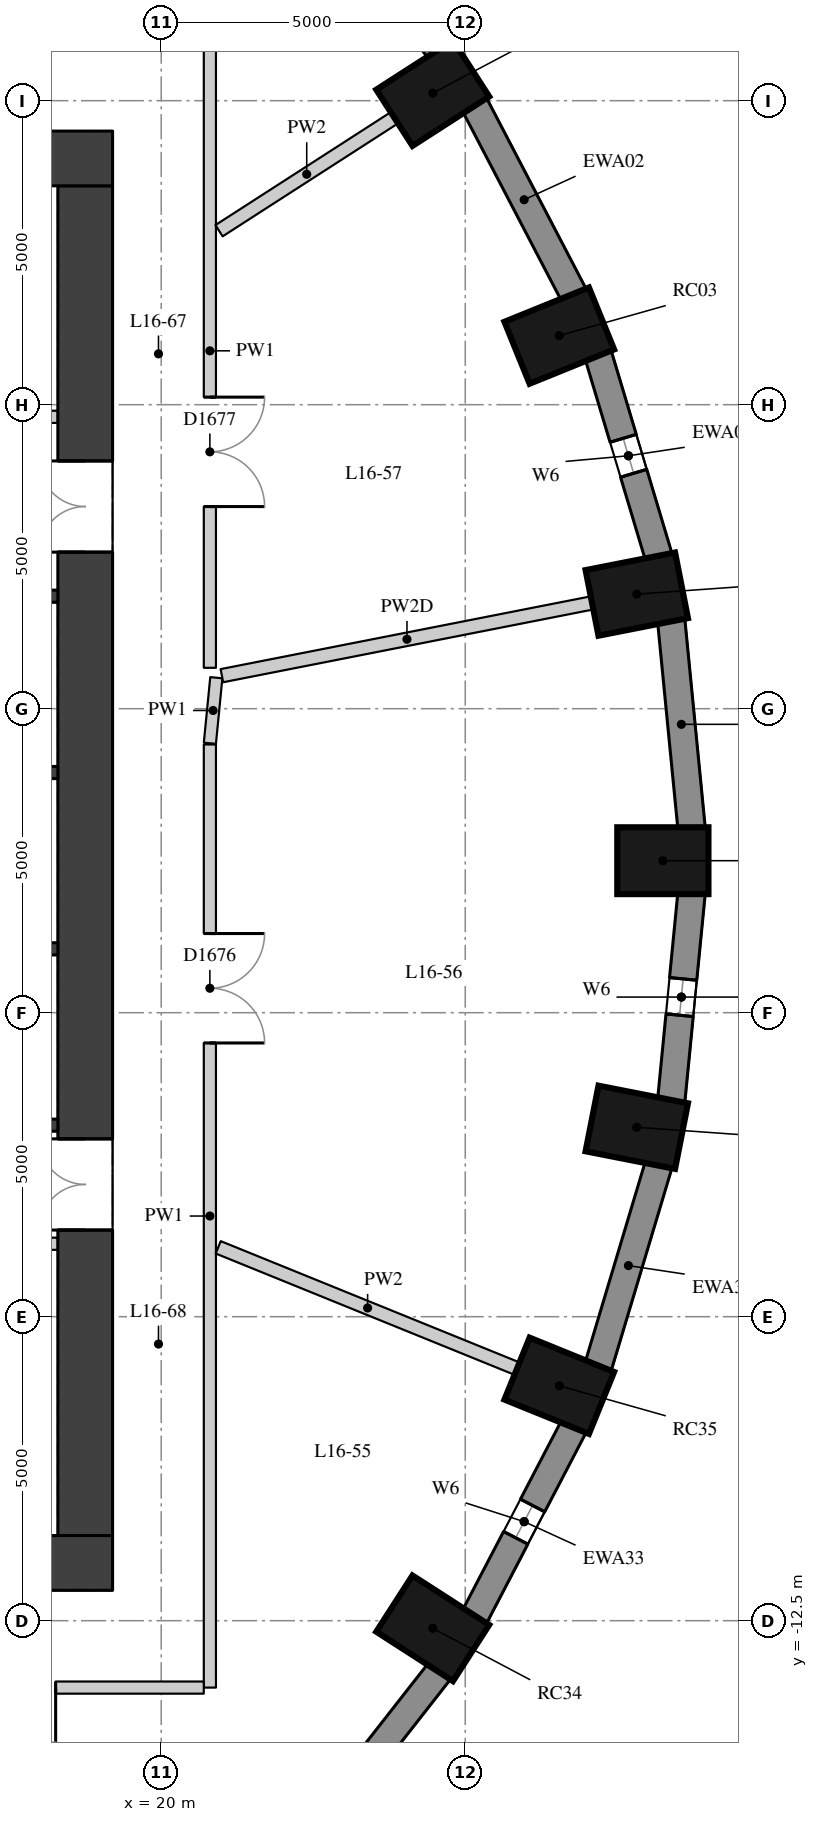
"""IFC4 building model, lengths in metres.
Left out: names, types, materials, properties, quantities, classifications, styles, units other than length and angle.
Written with IfcOpenShell. Run it as: python <this file> out.ifc"""

import sys

from ifc_helpers import new_model, si_unit, direction, frame, frame_2d, origin, origin_2d, place, context, subcontext, project, spatial, rectangle, extrude, element, fill, save


model = new_model("IFC4")
c1 = context("Model", 3, precision=1e-05, world=origin(), true_north=direction((0.0, 1.0)))
c2 = subcontext(c1, "Body", "Model", "MODEL_VIEW")
j1 = project(units=[si_unit("LENGTHUNIT", "METRE"), si_unit("PLANEANGLEUNIT", "RADIAN")], contexts=[c1])
p1 = place(None, origin())
s1 = spatial("IfcSite", under=j1, at=p1, CompositionType="ELEMENT")
p2 = place(p1, origin())
s2 = spatial("IfcBuilding", under=s1, at=p2, CompositionType="ELEMENT")
p3 = place(p2, frame((0.0, 0.0, 61.3)))
s3 = spatial("IfcBuildingStorey", under=s2, at=p3, CompositionType="ELEMENT", Elevation=61.3)
for number, where, z_axis, x_axis in (
    (1, (28.25, 0.0, 0.0), (0.0, 0.0, 1.0), (1.0, 0.0, 0.0)),
    (2, (27.821, 4.385, 0.0), (0.0, 0.0, 1.0), (0.981, 0.193, 0.0)),
    (3, (26.546, 8.636, 0.0), (0.0, 0.0, 1.0), (0.927, 0.376, 0.0)),
    (4, (24.465, 12.625, 0.0), (0.0, 0.0, 1.0), (0.841, 0.541, 0.0)),
    (5, (24.465, -12.625, 0.0), (0.0, 0.0, 1.0), (0.841, -0.541, 0.0)),
    (6, (26.546, -8.636, 0.0), (0.0, 0.0, 1.0), (0.927, -0.376, 0.0)),
    (7, (27.821, -4.385, 0.0), (0.0, 0.0, 1.0), (0.981, -0.193, 0.0)),
):
    element("IfcColumn", number, at=place(p3, frame(where, z_axis=z_axis, x_axis=x_axis)), inside=s3, PredefinedType="COLUMN", context=c2, shape_type="SweptSolid", body=[
        extrude(rectangle(XDim=1.5, YDim=1.1, at=origin_2d()), origin(), (0.0, 0.0, 1.0), 3.3),
    ])
p4 = place(p3, frame((28.722, 0.53, 0.0), z_axis=(0.0, 0.0, 1.0), x_axis=(-0.097389581596, 0.995246336038, 0.0)))
e8 = element("IfcWall", 8, at=p4, inside=s3, PredefinedType="SOLIDWALL", context=c2, shape_type="SweptSolid", body=[
    extrude(rectangle(XDim=3.442, YDim=0.45, at=frame_2d((1.721, 0.0))), origin(), (0.0, 0.0, 1.0), 3.02),
])
p5 = place(p3, frame((28.182, 4.996, 0.0), z_axis=(0.0, 0.0, 1.0), x_axis=(-0.287064133733, 0.957911364963, 0.0)))
e9 = element("IfcWall", 9, at=p5, inside=s3, PredefinedType="SOLIDWALL", context=c2, shape_type="SweptSolid", body=[
    extrude(rectangle(XDim=3.473, YDim=0.45, at=frame_2d((1.737, 0.0))), origin(), (0.0, 0.0, 1.0), 3.02),
])
p6 = place(p5, frame((1.437, 0.0, 0.4)))
e10 = element("IfcOpeningElement", 10, at=p6, cuts=e9, PredefinedType="OPENING", context=c2, shape_type="SweptSolid", body=[
    extrude(rectangle(XDim=0.6, YDim=1.75, at=frame_2d((0.3, 0.875))), frame((0.0, 0.235, 0.0), z_axis=(0.0, -1.0, 0.0), x_axis=(1.0, 0.0, 0.0)), (0.0, 0.0, 1.0), 0.47),
])
p7 = place(p3, frame((26.786, 9.305, 0.0), z_axis=(0.0, 0.0, 1.0), x_axis=(-0.462492775226, 0.886623050041, 0.0)))
e11 = element("IfcWall", 11, at=p7, inside=s3, PredefinedType="SOLIDWALL", context=c2, shape_type="SweptSolid", body=[
    extrude(rectangle(XDim=3.532, YDim=0.45, at=frame_2d((1.766, 0.0))), origin(), (0.0, 0.0, 1.0), 3.02),
])
p8 = place(p3, frame((24.578, 13.328, 0.0), z_axis=(0.0, 0.0, 1.0), x_axis=(-0.616661975264, 0.787228053529, 0.0)))
e12 = element("IfcWall", 12, at=p8, inside=s3, PredefinedType="SOLIDWALL", context=c2, shape_type="SweptSolid", body=[
    extrude(rectangle(XDim=3.61, YDim=0.45, at=frame_2d((1.805, 0.0))), origin(), (0.0, 0.0, 1.0), 3.02),
])
p9 = place(p8, frame((1.505, 0.0, 0.4)))
e13 = element("IfcOpeningElement", 13, at=p9, cuts=e12, PredefinedType="OPENING", context=c2, shape_type="SweptSolid", body=[
    extrude(rectangle(XDim=0.6, YDim=1.75, at=frame_2d((0.3, 0.875))), frame((0.0, 0.235, 0.0), z_axis=(0.0, -1.0, 0.0), x_axis=(1.0, 0.0, 0.0)), (0.0, 0.0, 1.0), 0.47),
])
p10 = place(p3, frame((22.352, -16.17, 0.0), z_axis=(0.0, 0.0, 1.0), x_axis=(0.616661975264, 0.787228053529, 0.0)))
e14 = element("IfcWall", 14, at=p10, inside=s3, PredefinedType="SOLIDWALL", context=c2, shape_type="SweptSolid", body=[
    extrude(rectangle(XDim=3.61, YDim=0.45, at=frame_2d((1.805, 0.0))), origin(), (0.0, 0.0, 1.0), 3.02),
])
p11 = place(p3, frame((25.152, -12.437, 0.0), z_axis=(0.0, 0.0, 1.0), x_axis=(0.462492775226, 0.886623050041, 0.0)))
e15 = element("IfcWall", 15, at=p11, inside=s3, PredefinedType="SOLIDWALL", context=c2, shape_type="SweptSolid", body=[
    extrude(rectangle(XDim=3.532, YDim=0.45, at=frame_2d((1.766, 0.0))), origin(), (0.0, 0.0, 1.0), 3.02),
])
p12 = place(p11, frame((1.466, 0.0, 0.4)))
e16 = element("IfcOpeningElement", 16, at=p12, cuts=e15, PredefinedType="OPENING", context=c2, shape_type="SweptSolid", body=[
    extrude(rectangle(XDim=0.6, YDim=1.75, at=frame_2d((0.3, 0.875))), frame((0.0, 0.235, 0.0), z_axis=(0.0, -1.0, 0.0), x_axis=(1.0, 0.0, 0.0)), (0.0, 0.0, 1.0), 0.47),
])
p13 = place(p3, frame((27.185, -8.323, 0.0), z_axis=(0.0, 0.0, 1.0), x_axis=(0.287064133733, 0.957911364963, 0.0)))
e17 = element("IfcWall", 17, at=p13, inside=s3, PredefinedType="SOLIDWALL", context=c2, shape_type="SweptSolid", body=[
    extrude(rectangle(XDim=3.473, YDim=0.45, at=frame_2d((1.737, 0.0))), origin(), (0.0, 0.0, 1.0), 3.02),
])
p14 = place(p3, frame((28.387, -3.956, 0.0), z_axis=(0.0, 0.0, 1.0), x_axis=(0.097389581596, 0.995246336038, 0.0)))
e18 = element("IfcWall", 18, at=p14, inside=s3, PredefinedType="SOLIDWALL", context=c2, shape_type="SweptSolid", body=[
    extrude(rectangle(XDim=3.442, YDim=0.45, at=frame_2d((1.721, 0.0))), origin(), (0.0, 0.0, 1.0), 3.02),
])
p15 = place(p14, frame((1.421, 0.0, 0.4)))
e19 = element("IfcOpeningElement", 19, at=p15, cuts=e18, PredefinedType="OPENING", context=c2, shape_type="SweptSolid", body=[
    extrude(rectangle(XDim=0.6, YDim=1.75, at=frame_2d((0.3, 0.875))), frame((0.0, 0.235, 0.0), z_axis=(0.0, -1.0, 0.0), x_axis=(1.0, 0.0, 0.0)), (0.0, 0.0, 1.0), 0.47),
])
p16 = place(p3, frame((18.75, -11.1, 0.0), z_axis=(0.0, 0.0, 1.0), x_axis=(0.0, 1.0, 0.0)))
e20 = element("IfcWall", 20, at=p16, inside=s3, PredefinedType="SHEAR", context=c2, shape_type="SweptSolid", body=[
    extrude(rectangle(XDim=22.2, YDim=0.9, at=frame_2d((11.1, 0.0))), origin(), (0.0, 0.0, 1.0), 3.02),
])
p17 = place(p16, frame((16.175, 0.0, 0.0)))
e21 = element("IfcOpeningElement", 21, at=p17, cuts=e20, PredefinedType="OPENING", context=c2, shape_type="SweptSolid", body=[
    extrude(rectangle(XDim=1.5, YDim=2.1, at=frame_2d((0.75, 1.05))), frame((0.0, 0.46, 0.0), z_axis=(0.0, -1.0, 0.0), x_axis=(1.0, 0.0, 0.0)), (0.0, 0.0, 1.0), 0.92),
])
p18 = place(p16, frame((5.025, 0.0, 0.0)))
e22 = element("IfcOpeningElement", 22, at=p18, cuts=e20, PredefinedType="OPENING", context=c2, shape_type="SweptSolid", body=[
    extrude(rectangle(XDim=1.5, YDim=2.1, at=frame_2d((0.75, 1.05))), frame((0.0, 0.46, 0.0), z_axis=(0.0, -1.0, 0.0), x_axis=(1.0, 0.0, 0.0)), (0.0, 0.0, 1.0), 0.92),
])
for number, where, z_axis, x_axis in (
    (23, (4.0, 11.55, 0.0), (0.0, 0.0, 1.0), (1.0, 0.0, 0.0)),
    (24, (4.0, -11.55, 0.0), (0.0, 0.0, 1.0), (1.0, 0.0, 0.0)),
):
    element("IfcWall", number, at=place(p3, frame(where, z_axis=z_axis, x_axis=x_axis)), inside=s3, PredefinedType="SHEAR", context=c2, shape_type="SweptSolid", body=[
        extrude(rectangle(XDim=15.2, YDim=0.9, at=frame_2d((7.6, 0.0))), origin(), (0.0, 0.0, 1.0), 3.02),
    ])
for number, where, z_axis, x_axis in (
    (25, (16.0, -4.35, 0.0), (0.0, 0.0, 1.0), (1.0, 0.0, 0.0)),
    (26, (16.0, -1.45, 0.0), (0.0, 0.0, 1.0), (1.0, 0.0, 0.0)),
    (27, (16.0, 1.45, 0.0), (0.0, 0.0, 1.0), (1.0, 0.0, 0.0)),
    (28, (16.0, 4.35, 0.0), (0.0, 0.0, 1.0), (1.0, 0.0, 0.0)),
):
    element("IfcWall", number, at=place(p3, frame(where, z_axis=z_axis, x_axis=x_axis)), inside=s3, PredefinedType="SHEAR", context=c2, shape_type="SweptSolid", body=[
        extrude(rectangle(XDim=2.3, YDim=0.2, at=frame_2d((1.15, 0.0))), origin(), (0.0, 0.0, 1.0), 3.02),
    ])
p19 = place(p3, frame((16.0, 7.3, 0.0), z_axis=(0.0, 0.0, 1.0), x_axis=(1.0, 0.0, 0.0)))
e29 = element("IfcWall", 29, at=p19, inside=s3, PredefinedType="PARTITIONING", context=c2, shape_type="SweptSolid", body=[
    extrude(rectangle(XDim=2.3, YDim=0.2, at=frame_2d((1.15, 0.0))), origin(), (0.0, 0.0, 1.0), 3.02),
])
p20 = place(p19, frame((0.2, 0.0, 0.0)))
e30 = element("IfcOpeningElement", 30, at=p20, cuts=e29, PredefinedType="OPENING", context=c2, shape_type="SweptSolid", body=[
    extrude(rectangle(XDim=0.9, YDim=2.1, at=frame_2d((0.45, 1.05))), frame((0.0, 0.11, 0.0), z_axis=(0.0, -1.0, 0.0), x_axis=(1.0, 0.0, 0.0)), (0.0, 0.0, 1.0), 0.22),
])
p21 = place(p3, frame((16.0, -6.3, 0.0), z_axis=(0.0, 0.0, 1.0), x_axis=(1.0, 0.0, 0.0)))
e31 = element("IfcWall", 31, at=p21, inside=s3, PredefinedType="PARTITIONING", context=c2, shape_type="SweptSolid", body=[
    extrude(rectangle(XDim=2.3, YDim=0.2, at=frame_2d((1.15, 0.0))), origin(), (0.0, 0.0, 1.0), 3.02),
])
p22 = place(p21, frame((0.1, 0.0, 0.0)))
e32 = element("IfcOpeningElement", 32, at=p22, cuts=e31, PredefinedType="OPENING", context=c2, shape_type="SweptSolid", body=[
    extrude(rectangle(XDim=0.9, YDim=2.1, at=frame_2d((0.45, 1.05))), frame((0.0, 0.11, 0.0), z_axis=(0.0, -1.0, 0.0), x_axis=(1.0, 0.0, 0.0)), (0.0, 0.0, 1.0), 0.22),
])
p23 = place(p3, frame((20.8, 13.6, 0.0), z_axis=(0.0, 0.0, 1.0), x_axis=(0.0, -1.0, 0.0)))
e33 = element("IfcWall", 33, at=p23, inside=s3, PredefinedType="PARTITIONING", context=c2, shape_type="SweptSolid", body=[
    extrude(rectangle(XDim=10.428, YDim=0.2, at=frame_2d((5.214, 0.0))), origin(), (0.0, 0.0, 1.0), 3.02),
])
p24 = place(p23, frame((5.976, 0.0, 0.0)))
e34 = element("IfcOpeningElement", 34, at=p24, cuts=e33, PredefinedType="OPENING", context=c2, shape_type="SweptSolid", body=[
    extrude(rectangle(XDim=1.8, YDim=2.1, at=frame_2d((0.9, 1.05))), frame((0.0, 0.11, 0.0), z_axis=(0.0, -1.0, 0.0), x_axis=(1.0, 0.0, 0.0)), (0.0, 0.0, 1.0), 0.22),
])
p25 = place(p3, frame((20.906, 3.01, 0.0), z_axis=(0.0, 0.0, 1.0), x_axis=(-0.09782971129, -0.995203169001, 0.0)))
e35 = element("IfcWall", 35, at=p25, inside=s3, PredefinedType="PARTITIONING", context=c2, shape_type="SweptSolid", body=[
    extrude(rectangle(XDim=1.083, YDim=0.2, at=frame_2d((0.542, 0.0))), origin(), (0.0, 0.0, 1.0), 3.02),
])
p26 = place(p3, frame((20.8, 1.912, 0.0), z_axis=(0.0, 0.0, 1.0), x_axis=(0.0, -1.0, 0.0)))
e36 = element("IfcWall", 36, at=p26, inside=s3, PredefinedType="PARTITIONING", context=c2, shape_type="SweptSolid", body=[
    extrude(rectangle(XDim=15.512, YDim=0.2, at=frame_2d((7.756, 0.0))), origin(), (0.0, 0.0, 1.0), 3.02),
])
p27 = place(p26, frame((3.11, 0.0, 0.0)))
e37 = element("IfcOpeningElement", 37, at=p27, cuts=e36, PredefinedType="OPENING", context=c2, shape_type="SweptSolid", body=[
    extrude(rectangle(XDim=1.8, YDim=2.1, at=frame_2d((0.9, 1.05))), frame((0.0, 0.11, 0.0), z_axis=(0.0, -1.0, 0.0), x_axis=(1.0, 0.0, 0.0)), (0.0, 0.0, 1.0), 0.22),
])
p28 = place(p3, frame((20.7, -13.6, 0.0), z_axis=(0.0, 0.0, 1.0), x_axis=(-1.0, 0.0, 0.0)))
e38 = element("IfcWall", 38, at=p28, inside=s3, PredefinedType="PARTITIONING", context=c2, shape_type="SweptSolid", body=[
    extrude(rectangle(XDim=9.331, YDim=0.2, at=frame_2d((4.666, 0.0))), origin(), (0.0, 0.0, 1.0), 3.02),
])
p29 = place(p28, frame((2.436, 0.0, 0.0)))
e39 = element("IfcOpeningElement", 39, at=p29, cuts=e38, PredefinedType="OPENING", context=c2, shape_type="SweptSolid", body=[
    extrude(rectangle(XDim=1.8, YDim=2.1, at=frame_2d((0.9, 1.05))), frame((0.0, 0.11, 0.0), z_axis=(0.0, -1.0, 0.0), x_axis=(1.0, 0.0, 0.0)), (0.0, 0.0, 1.0), 0.22),
])
p30 = place(p3, frame((27.085, 4.24, 0.0), z_axis=(0.0, 0.0, 1.0), x_axis=(-0.981208260902, -0.192951674616, 0.0)))
e40 = element("IfcWall", 40, at=p30, inside=s3, PredefinedType="PARTITIONING", context=c2, shape_type="SweptSolid", body=[
    extrude(rectangle(XDim=6.204, YDim=0.22, at=frame_2d((3.102, 0.0))), origin(), (0.0, 0.0, 1.0), 2.47),
])
p31 = place(p3, frame((23.835, 12.219, 0.0), z_axis=(0.0, 0.0, 1.0), x_axis=(-0.840694872373, -0.541509124176, 0.0)))
e41 = element("IfcWall", 41, at=p31, inside=s3, PredefinedType="PARTITIONING", context=c2, shape_type="SweptSolid", body=[
    extrude(rectangle(XDim=3.43, YDim=0.22, at=frame_2d((1.715, 0.0))), origin(), (0.0, 0.0, 1.0), 3.02),
])
p32 = place(p3, frame((25.851, -8.354, 0.0), z_axis=(0.0, 0.0, 1.0), x_axis=(-0.926546814299, 0.376179479653, 0.0)))
e42 = element("IfcWall", 42, at=p32, inside=s3, PredefinedType="PARTITIONING", context=c2, shape_type="SweptSolid", body=[
    extrude(rectangle(XDim=5.304, YDim=0.22, at=frame_2d((2.652, 0.0))), origin(), (0.0, 0.0, 1.0), 3.02),
])
p33 = place(p6, origin())
e43 = element("IfcWindow", 43, at=p33, inside=s3, PartitioningType="SINGLE_PANEL", PredefinedType="WINDOW", context=c2, shape_type="SweptSolid", body=[
    extrude(rectangle(XDim=0.6, YDim=1.75, at=frame_2d((0.3, 0.875))), frame((0.0, 0.035, 0.0), z_axis=(0.0, -1.0, 0.0), x_axis=(1.0, 0.0, 0.0)), (0.0, 0.0, 1.0), 0.06),
])
fill(e10, e43)
p34 = place(p12, origin())
e44 = element("IfcWindow", 44, at=p34, inside=s3, PartitioningType="SINGLE_PANEL", PredefinedType="WINDOW", context=c2, shape_type="SweptSolid", body=[
    extrude(rectangle(XDim=0.6, YDim=1.75, at=frame_2d((0.3, 0.875))), frame((0.0, 0.035, 0.0), z_axis=(0.0, -1.0, 0.0), x_axis=(1.0, 0.0, 0.0)), (0.0, 0.0, 1.0), 0.06),
])
fill(e16, e44)
p35 = place(p15, origin())
e45 = element("IfcWindow", 45, at=p35, inside=s3, PartitioningType="SINGLE_PANEL", PredefinedType="WINDOW", context=c2, shape_type="SweptSolid", body=[
    extrude(rectangle(XDim=0.6, YDim=1.75, at=frame_2d((0.3, 0.875))), frame((0.0, 0.035, 0.0), z_axis=(0.0, -1.0, 0.0), x_axis=(1.0, 0.0, 0.0)), (0.0, 0.0, 1.0), 0.06),
])
fill(e19, e45)
p36 = place(p17, origin())
e46 = element("IfcDoor", 46, at=p36, inside=s3, OperationType="DOUBLE_DOOR_SINGLE_SWING", PredefinedType="DOOR", context=c2, shape_type="SweptSolid", body=[
    extrude(rectangle(XDim=1.5, YDim=2.1, at=frame_2d((0.75, 1.05))), frame((0.0, 0.025, 0.0), z_axis=(0.0, -1.0, 0.0), x_axis=(1.0, 0.0, 0.0)), (0.0, 0.0, 1.0), 0.05),
])
fill(e21, e46)
p37 = place(p18, origin())
e47 = element("IfcDoor", 47, at=p37, inside=s3, OperationType="DOUBLE_DOOR_SINGLE_SWING", PredefinedType="DOOR", context=c2, shape_type="SweptSolid", body=[
    extrude(rectangle(XDim=1.5, YDim=2.1, at=frame_2d((0.75, 1.05))), frame((0.0, 0.025, 0.0), z_axis=(0.0, -1.0, 0.0), x_axis=(1.0, 0.0, 0.0)), (0.0, 0.0, 1.0), 0.05),
])
fill(e22, e47)
p38 = place(p29, origin())
e48 = element("IfcDoor", 48, at=p38, inside=s3, OperationType="DOUBLE_DOOR_SINGLE_SWING", PredefinedType="DOOR", context=c2, shape_type="SweptSolid", body=[
    extrude(rectangle(XDim=1.8, YDim=2.1, at=frame_2d((0.9, 1.05))), frame((0.0, 0.025, 0.0), z_axis=(0.0, -1.0, 0.0), x_axis=(1.0, 0.0, 0.0)), (0.0, 0.0, 1.0), 0.05),
])
fill(e39, e48)
p39 = place(p27, origin())
e49 = element("IfcDoor", 49, at=p39, inside=s3, OperationType="DOUBLE_DOOR_SINGLE_SWING", PredefinedType="DOOR", context=c2, shape_type="SweptSolid", body=[
    extrude(rectangle(XDim=1.8, YDim=2.1, at=frame_2d((0.9, 1.05))), frame((0.0, 0.025, 0.0), z_axis=(0.0, -1.0, 0.0), x_axis=(1.0, 0.0, 0.0)), (0.0, 0.0, 1.0), 0.05),
])
fill(e37, e49)
p40 = place(p24, origin())
e50 = element("IfcDoor", 50, at=p40, inside=s3, OperationType="DOUBLE_DOOR_SINGLE_SWING", PredefinedType="DOOR", context=c2, shape_type="SweptSolid", body=[
    extrude(rectangle(XDim=1.8, YDim=2.1, at=frame_2d((0.9, 1.05))), frame((0.0, 0.025, 0.0), z_axis=(0.0, -1.0, 0.0), x_axis=(1.0, 0.0, 0.0)), (0.0, 0.0, 1.0), 0.05),
])
fill(e34, e50)
save(model, sys.argv[1])
